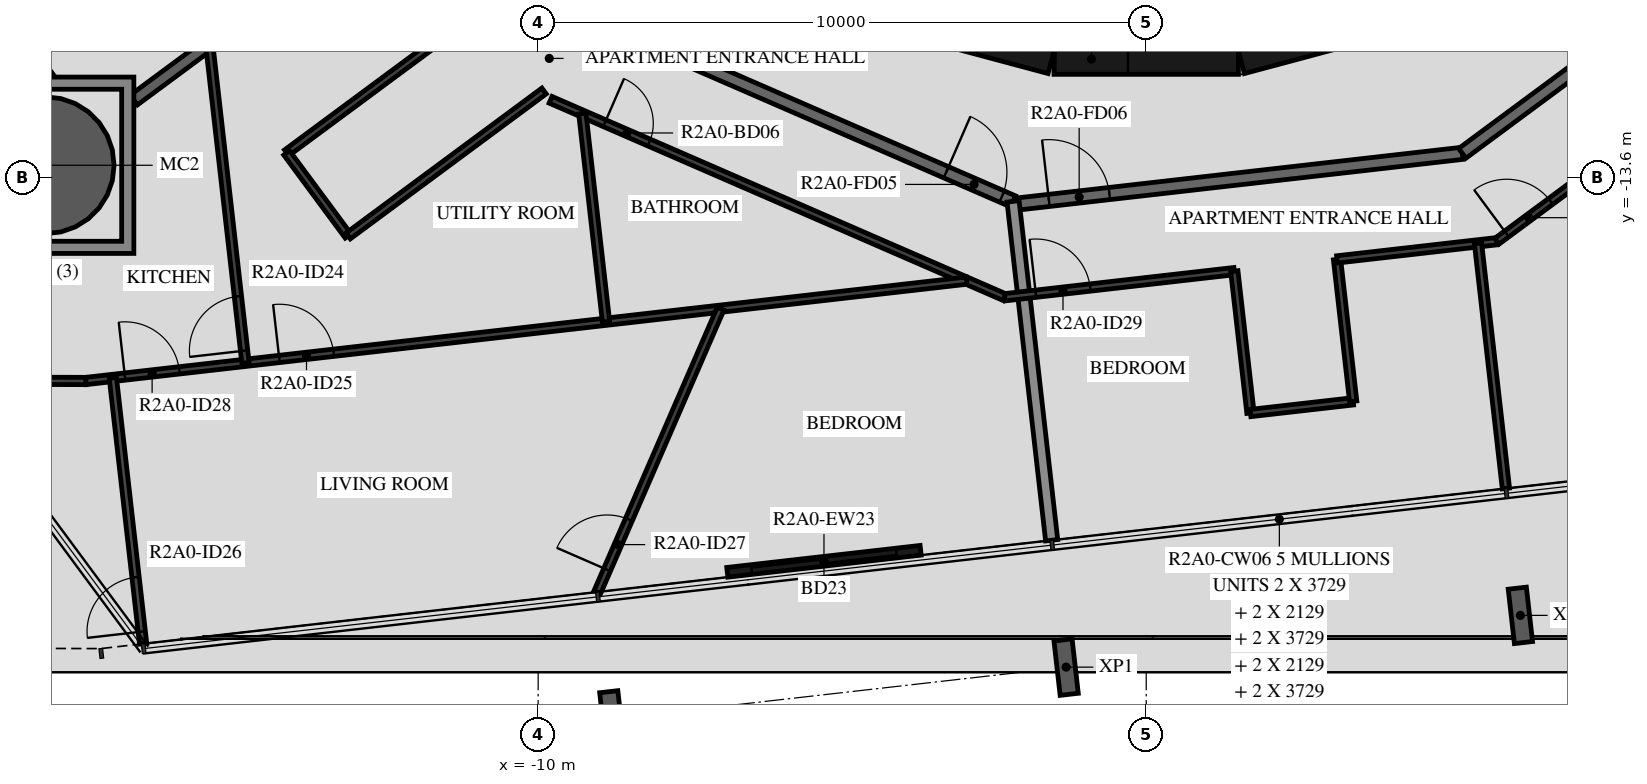
"""IFC4 building model, lengths in metres.
Left out: names, types, materials, properties, quantities, classifications, styles, units other than length and angle.
Written with IfcOpenShell. Run it as: python <this file> out.ifc"""

import sys

from ifc_helpers import new_model, si_unit, direction, frame, frame_2d, origin, origin_2d, place, context, subcontext, project, spatial, polyline, rectangle, hollow_circle, i_section, outline, extrude, element, fill, save


model = new_model("IFC4")
c1 = context("Model", 3, precision=1e-05, world=origin(), true_north=direction((0.0, 1.0)))
c2 = subcontext(c1, "Body", "Model", "MODEL_VIEW")
j1 = project(units=[si_unit("LENGTHUNIT", "METRE"), si_unit("PLANEANGLEUNIT", "RADIAN")], contexts=[c1])
p1 = place(None, origin())
s1 = spatial("IfcSite", under=j1, at=p1, CompositionType="ELEMENT")
p2 = place(p1, origin())
s2 = spatial("IfcBuilding", under=s1, at=p2, CompositionType="ELEMENT")
p3 = place(p2, frame((0.0, 0.0, 76.7)))
s3 = spatial("IfcBuildingStorey", under=s2, at=p3, CompositionType="ELEMENT", Elevation=76.7)
p4 = place(p3, frame((-18.099, -13.393, -0.45), z_axis=(0.0, 0.0, 1.0), x_axis=(1.0, 0.0, 0.0)))
e1 = element("IfcColumn", 1, at=p4, inside=s3, PredefinedType="COLUMN", context=c2, shape_type="SweptSolid", body=[
    extrude(hollow_circle(Radius=1.125, WallThickness=0.055, at=origin_2d()), origin(), (0.0, 0.0, 1.0), 3.57),
])
for number, where, z_axis, x_axis in (
    (2, (6.153, -20.795, -0.45), (0.0, 0.0, 1.0), (-0.994, -0.113, 0.0)),
    (3, (-8.788, -22.497, -0.45), (0.0, 0.0, 1.0), (-0.994, -0.113, 0.0)),
    (4, (-1.317, -21.646, -0.45), (0.0, 0.0, 1.0), (-0.994, -0.113, 0.0)),
):
    element("IfcColumn", number, at=place(p3, frame(where, z_axis=z_axis, x_axis=x_axis)), inside=s3, PredefinedType="COLUMN", context=c2, shape_type="SweptSolid", body=[
        extrude(i_section(OverallWidth=0.3, OverallDepth=0.9, WebThickness=0.019, FlangeThickness=0.035, FilletRadius=0.03, at=origin_2d()), origin(), (0.0, 0.0, 1.0), 3.57),
    ])
p5 = place(p3, frame((-6.889, -20.086, 0.0), z_axis=(0.0, 0.0, 1.0), x_axis=(0.993578576686, 0.113144208648, 0.0)))
e5 = element("IfcWall", 5, at=p5, inside=s3, PredefinedType="STANDARD", context=c2, shape_type="SweptSolid", body=[
    extrude(rectangle(XDim=3.2, YDim=0.16, at=frame_2d((1.6, 0.0))), origin(), (0.0, 0.0, 1.0), 3.12),
])
p6 = place(p5, frame((0.4, 0.0, 0.0)))
e6 = element("IfcOpeningElement", 6, at=p6, cuts=e5, PredefinedType="OPENING", context=c2, shape_type="SweptSolid", body=[
    extrude(rectangle(XDim=2.4, YDim=2.4, at=frame_2d((1.2, 1.2))), frame((0.0, 0.09, 0.0), z_axis=(0.0, -1.0, 0.0), x_axis=(1.0, 0.0, 0.0)), (0.0, 0.0, 1.0), 0.18),
])
for number, where, z_axis, x_axis in (
    (7, (1.55, -11.643, 0.0), (0.0, 0.0, 1.0), (0.966, 0.259, 0.0)),
    (8, (-4.479, -10.858, 0.0), (0.0, 0.0, 1.0), (0.966, -0.259, 0.0)),
):
    element("IfcWall", number, at=place(p3, frame(where, z_axis=z_axis, x_axis=x_axis)), inside=s3, PredefinedType="SHEAR", context=c2, shape_type="SweptSolid", body=[
        extrude(rectangle(XDim=3.033, YDim=0.5, at=frame_2d((1.516, 0.0))), origin(), (0.0, 0.0, 1.0), 3.12),
    ])
p7 = place(p3, frame((-1.516, -11.647, 0.0), z_axis=(0.0, 0.0, 1.0), x_axis=(1.0, 0.0, 0.0)))
e9 = element("IfcWall", 9, at=p7, inside=s3, PredefinedType="SHEAR", context=c2, shape_type="SweptSolid", body=[
    extrude(rectangle(XDim=3.033, YDim=0.5, at=frame_2d((1.516, 0.0))), origin(), (0.0, 0.0, 1.0), 3.12),
])
p8 = place(p7, frame((0.016, 0.0, 0.0)))
e10 = element("IfcOpeningElement", 10, at=p8, cuts=e9, PredefinedType="OPENING", context=c2, shape_type="SweptSolid", body=[
    extrude(rectangle(XDim=1.2, YDim=2.1, at=frame_2d((0.6, 1.05))), frame((0.0, 0.26, 0.0), z_axis=(0.0, -1.0, 0.0), x_axis=(1.0, 0.0, 0.0)), (0.0, 0.0, 1.0), 0.52),
])
p9 = place(p3, frame((-8.829, -11.1, 0.0), z_axis=(0.0, 0.0, 1.0), x_axis=(0.917063622491, -0.398740908742, 0.0)))
e11 = element("IfcWall", 11, at=p9, inside=s3, PredefinedType="STANDARD", context=c2, shape_type="SweptSolid", body=[
    extrude(rectangle(XDim=7.24, YDim=0.2, at=frame_2d((3.62, 0.0))), origin(), (0.0, 0.0, 1.0), 3.12),
])
p10 = place(p9, frame((6.04, 0.0, 0.0)))
e12 = element("IfcOpeningElement", 12, at=p10, cuts=e11, PredefinedType="OPENING", context=c2, shape_type="SweptSolid", body=[
    extrude(rectangle(XDim=1.0, YDim=2.1, at=frame_2d((0.5, 1.05))), frame((0.0, 0.11, 0.0), z_axis=(0.0, -1.0, 0.0), x_axis=(1.0, 0.0, 0.0)), (0.0, 0.0, 1.0), 0.22),
])
p11 = place(p3, frame((-2.096, -14.028, 0.0), z_axis=(0.0, 0.0, 1.0), x_axis=(0.993569170114, 0.113226782163, 0.0)))
e13 = element("IfcWall", 13, at=p11, inside=s3, PredefinedType="STANDARD", context=c2, shape_type="SweptSolid", body=[
    extrude(rectangle(XDim=7.342, YDim=0.2, at=frame_2d((3.671, 0.0))), origin(), (0.0, 0.0, 1.0), 3.12),
])
p12 = place(p11, frame((0.5, 0.0, 0.0)))
e14 = element("IfcOpeningElement", 14, at=p12, cuts=e13, PredefinedType="OPENING", context=c2, shape_type="SweptSolid", body=[
    extrude(rectangle(XDim=1.0, YDim=2.1, at=frame_2d((0.5, 1.05))), frame((0.0, 0.11, 0.0), z_axis=(0.0, -1.0, 0.0), x_axis=(1.0, 0.0, 0.0)), (0.0, 0.0, 1.0), 0.22),
])
p13 = place(p3, frame((5.198, -13.196, 0.0), z_axis=(0.0, 0.0, 1.0), x_axis=(0.803869883159, 0.594805187394, 0.0)))
e15 = element("IfcWall", 15, at=p13, inside=s3, PredefinedType="STANDARD", context=c2, shape_type="SweptSolid", body=[
    extrude(rectangle(XDim=7.342, YDim=0.2, at=frame_2d((3.671, 0.0))), origin(), (0.0, 0.0, 1.0), 3.12),
])
p14 = place(p3, frame((-16.649, -12.32, 0.0), z_axis=(0.0, 0.0, 1.0), x_axis=(0.803804030903, 0.594894175383, 0.0)))
e16 = element("IfcWall", 16, at=p14, inside=s3, PredefinedType="STANDARD", context=c2, shape_type="SweptSolid", body=[
    extrude(rectangle(XDim=1.542, YDim=0.2, at=frame_2d((0.771, 0.0))), origin(), (0.0, 0.0, 1.0), 3.12),
])
p15 = place(p3, frame((-1.555, -19.559, 0.0), z_axis=(0.0, 0.0, 1.0), x_axis=(-0.113221250863, 0.993569800443, 0.0)))
e17 = element("IfcWall", 17, at=p15, inside=s3, PredefinedType="STANDARD", context=c2, shape_type="SweptSolid", body=[
    extrude(rectangle(XDim=5.609, YDim=0.2, at=frame_2d((2.804, 0.0))), origin(), (0.0, 0.0, 1.0), 2.73),
])
p16 = place(p3, frame((-21.298, -11.722, 0.0), z_axis=(0.0, 0.0, 1.0), x_axis=(0.398737387658, 0.917065153456, 0.0)))
e18 = element("IfcWall", 18, at=p16, inside=s3, PredefinedType="PARTITIONING", context=c2, shape_type="SweptSolid", body=[
    extrude(rectangle(XDim=11.875, YDim=0.12, at=frame_2d((5.938, 0.0))), origin(), (0.0, 0.0, 1.0), 3.12),
])
p17 = place(p16, frame((8.26, 0.0, 0.0)))
e19 = element("IfcOpeningElement", 19, at=p17, cuts=e18, PredefinedType="OPENING", context=c2, shape_type="SweptSolid", body=[
    extrude(rectangle(XDim=0.9, YDim=2.1, at=frame_2d((0.45, 1.05))), frame((0.0, 0.07, 0.0), z_axis=(0.0, -1.0, 0.0), x_axis=(1.0, 0.0, 0.0)), (0.0, 0.0, 1.0), 0.14),
])
p18 = place(p16, frame((3.094, 0.0, 0.0)))
e20 = element("IfcOpeningElement", 20, at=p18, cuts=e18, PredefinedType="OPENING", context=c2, shape_type="SweptSolid", body=[
    extrude(rectangle(XDim=0.9, YDim=2.1, at=frame_2d((0.45, 1.05))), frame((0.0, 0.07, 0.0), z_axis=(0.0, -1.0, 0.0), x_axis=(1.0, 0.0, 0.0)), (0.0, 0.0, 1.0), 0.14),
])
p19 = place(p3, frame((-20.144, -9.068, 0.0), z_axis=(0.0, 0.0, 1.0), x_axis=(0.59487477233, -0.803818390711, 0.0)))
e21 = element("IfcWall", 21, at=p19, inside=s3, PredefinedType="PARTITIONING", context=c2, shape_type="SweptSolid", body=[
    extrude(rectangle(XDim=3.575, YDim=0.12, at=frame_2d((1.788, 0.0))), origin(), (0.0, 0.0, 1.0), 3.12),
])
p20 = place(p19, frame((0.4, 0.0, 0.0)))
e22 = element("IfcOpeningElement", 22, at=p20, cuts=e21, PredefinedType="OPENING", context=c2, shape_type="SweptSolid", body=[
    extrude(rectangle(XDim=0.8, YDim=2.1, at=frame_2d((0.4, 1.05))), frame((0.0, 0.07, 0.0), z_axis=(0.0, -1.0, 0.0), x_axis=(1.0, 0.0, 0.0)), (0.0, 0.0, 1.0), 0.14),
])
p21 = place(p3, frame((-10.914, -10.804, 0.0), z_axis=(0.0, 0.0, 1.0), x_axis=(-0.803864616889, -0.594812304609, 0.0)))
e23 = element("IfcWall", 23, at=p21, inside=s3, PredefinedType="PARTITIONING", context=c2, shape_type="SweptSolid", body=[
    extrude(rectangle(XDim=4.008, YDim=0.12, at=frame_2d((2.004, 0.0))), origin(), (0.0, 0.0, 1.0), 3.12),
])
p22 = place(p3, frame((-14.136, -13.188, 0.0), z_axis=(0.0, 0.0, 1.0), x_axis=(0.594863421241, -0.803826791087, 0.0)))
e24 = element("IfcWall", 24, at=p22, inside=s3, PredefinedType="PARTITIONING", context=c2, shape_type="SweptSolid", body=[
    extrude(rectangle(XDim=1.7, YDim=0.12, at=frame_2d((0.85, 0.0))), origin(), (0.0, 0.0, 1.0), 3.12),
])
p23 = place(p3, frame((-13.125, -14.555, 0.0), z_axis=(0.0, 0.0, 1.0), x_axis=(0.80389374229, 0.594772940799, 0.0)))
e25 = element("IfcWall", 25, at=p23, inside=s3, PredefinedType="PARTITIONING", context=c2, shape_type="SweptSolid", body=[
    extrude(rectangle(XDim=4.008, YDim=0.12, at=frame_2d((2.004, 0.0))), origin(), (0.0, 0.0, 1.0), 3.12),
])
p24 = place(p3, frame((-9.796, -12.315, 0.0), z_axis=(0.0, 0.0, 1.0), x_axis=(0.917059572812, -0.398750222463, 0.0)))
e26 = element("IfcWall", 26, at=p24, inside=s3, PredefinedType="PARTITIONING", context=c2, shape_type="SweptSolid", body=[
    extrude(rectangle(XDim=8.146, YDim=0.12, at=frame_2d((4.073, 0.0))), origin(), (0.0, 0.0, 1.0), 3.12),
])
p25 = place(p24, frame((0.969, 0.0, 0.0)))
e27 = element("IfcOpeningElement", 27, at=p25, cuts=e26, PredefinedType="OPENING", context=c2, shape_type="SweptSolid", body=[
    extrude(rectangle(XDim=0.8, YDim=2.1, at=frame_2d((0.4, 1.05))), frame((0.0, 0.07, 0.0), z_axis=(0.0, -1.0, 0.0), x_axis=(1.0, 0.0, 0.0)), (0.0, 0.0, 1.0), 0.14),
])
p26 = place(p3, frame((-2.326, -15.563, 0.0), z_axis=(0.0, 0.0, 1.0), x_axis=(0.993575068384, 0.113175012641, 0.0)))
e28 = element("IfcWall", 28, at=p26, inside=s3, PredefinedType="PARTITIONING", context=c2, shape_type="SweptSolid", body=[
    extrude(rectangle(XDim=3.799, YDim=0.12, at=frame_2d((1.899, 0.0))), origin(), (0.0, 0.0, 1.0), 3.12),
])
p27 = place(p26, frame((0.513, 0.0, 0.0)))
e29 = element("IfcOpeningElement", 29, at=p27, cuts=e28, PredefinedType="OPENING", context=c2, shape_type="SweptSolid", body=[
    extrude(rectangle(XDim=0.9, YDim=2.1, at=frame_2d((0.45, 1.05))), frame((0.0, 0.07, 0.0), z_axis=(0.0, -1.0, 0.0), x_axis=(1.0, 0.0, 0.0)), (0.0, 0.0, 1.0), 0.14),
])
p28 = place(p3, frame((-18.524, -16.937, 0.0), z_axis=(0.0, 0.0, 1.0), x_axis=(0.999995736722, -0.00292002349, 0.0)))
e30 = element("IfcWall", 30, at=p28, inside=s3, PredefinedType="PARTITIONING", context=c2, shape_type="SweptSolid", body=[
    extrude(rectangle(XDim=1.087, YDim=0.12, at=frame_2d((0.543, 0.0))), origin(), (0.0, 0.0, 1.0), 3.12),
])
p29 = place(p3, frame((-17.437, -16.94, 0.0), z_axis=(0.0, 0.0, 1.0), x_axis=(0.993573314119, 0.113190412448, 0.0)))
e31 = element("IfcWall", 31, at=p29, inside=s3, PredefinedType="PARTITIONING", context=c2, shape_type="SweptSolid", body=[
    extrude(rectangle(XDim=14.576, YDim=0.12, at=frame_2d((7.288, 0.0))), origin(), (0.0, 0.0, 1.0), 3.12),
])
p30 = place(p29, frame((3.201, 0.0, 0.0)))
e32 = element("IfcOpeningElement", 32, at=p30, cuts=e31, PredefinedType="OPENING", context=c2, shape_type="SweptSolid", body=[
    extrude(rectangle(XDim=0.9, YDim=2.1, at=frame_2d((0.45, 1.05))), frame((0.0, 0.07, 0.0), z_axis=(0.0, -1.0, 0.0), x_axis=(1.0, 0.0, 0.0)), (0.0, 0.0, 1.0), 0.14),
])
p31 = place(p29, frame((0.645, 0.0, 0.0)))
e33 = element("IfcOpeningElement", 33, at=p31, cuts=e31, PredefinedType="OPENING", context=c2, shape_type="SweptSolid", body=[
    extrude(rectangle(XDim=0.9, YDim=2.1, at=frame_2d((0.45, 1.05))), frame((0.0, 0.07, 0.0), z_axis=(0.0, -1.0, 0.0), x_axis=(1.0, 0.0, 0.0)), (0.0, 0.0, 1.0), 0.14),
])
p32 = place(p3, frame((-14.813, -16.641, 0.0), z_axis=(0.0, 0.0, 1.0), x_axis=(-0.113210971478, 0.993570971767, 0.0)))
e34 = element("IfcWall", 34, at=p32, inside=s3, PredefinedType="PARTITIONING", context=c2, shape_type="SweptSolid", body=[
    extrude(rectangle(XDim=5.273, YDim=0.12, at=frame_2d((2.636, 0.0))), origin(), (0.0, 0.0, 1.0), 3.12),
])
p33 = place(p32, frame((0.2, 0.0, 0.0)))
e35 = element("IfcOpeningElement", 35, at=p33, cuts=e34, PredefinedType="OPENING", context=c2, shape_type="SweptSolid", body=[
    extrude(rectangle(XDim=0.9, YDim=2.1, at=frame_2d((0.45, 1.05))), frame((0.0, 0.07, 0.0), z_axis=(0.0, -1.0, 0.0), x_axis=(1.0, 0.0, 0.0)), (0.0, 0.0, 1.0), 0.14),
])
p34 = place(p3, frame((-16.496, -21.262, 0.0), z_axis=(0.0, 0.0, 1.0), x_axis=(-0.1132445713, 0.993567142709, 0.0)))
e36 = element("IfcWall", 36, at=p34, inside=s3, PredefinedType="PARTITIONING", context=c2, shape_type="SweptSolid", body=[
    extrude(rectangle(XDim=4.4, YDim=0.12, at=frame_2d((2.2, 0.0))), origin(), (0.0, 0.0, 1.0), 2.73),
])
p35 = place(p34, frame((0.2, 0.0, 0.0)))
e37 = element("IfcOpeningElement", 37, at=p35, cuts=e36, PredefinedType="OPENING", context=c2, shape_type="SweptSolid", body=[
    extrude(rectangle(XDim=0.9, YDim=2.1, at=frame_2d((0.45, 1.05))), frame((0.0, 0.07, 0.0), z_axis=(0.0, -1.0, 0.0), x_axis=(1.0, 0.0, 0.0)), (0.0, 0.0, 1.0), 0.14),
])
p36 = place(p3, frame((-8.884, -15.966, 0.0), z_axis=(0.0, 0.0, 1.0), x_axis=(-0.113230836929, 0.993568708026, 0.0)))
e38 = element("IfcWall", 38, at=p36, inside=s3, PredefinedType="PARTITIONING", context=c2, shape_type="SweptSolid", body=[
    extrude(rectangle(XDim=3.446, YDim=0.12, at=frame_2d((1.723, 0.0))), origin(), (0.0, 0.0, 1.0), 3.12),
])
p37 = place(p3, frame((-9.026, -20.41, 0.0), z_axis=(0.0, 0.0, 1.0), x_axis=(0.398750711167, 0.917059360316, 0.0)))
e39 = element("IfcWall", 39, at=p37, inside=s3, PredefinedType="PARTITIONING", context=c2, shape_type="SweptSolid", body=[
    extrude(rectangle(XDim=5.081, YDim=0.12, at=frame_2d((2.54, 0.0))), origin(), (0.0, 0.0, 1.0), 3.12),
])
p38 = place(p37, frame((0.4, 0.0, 0.0)))
e40 = element("IfcOpeningElement", 40, at=p38, cuts=e39, PredefinedType="OPENING", context=c2, shape_type="SweptSolid", body=[
    extrude(rectangle(XDim=0.9, YDim=2.1, at=frame_2d((0.45, 1.05))), frame((0.0, 0.07, 0.0), z_axis=(0.0, -1.0, 0.0), x_axis=(1.0, 0.0, 0.0)), (0.0, 0.0, 1.0), 0.14),
])
p39 = place(p3, frame((1.448, -15.133, 0.0), z_axis=(0.0, 0.0, 1.0), x_axis=(0.113180189053, -0.993574478741, 0.0)))
e41 = element("IfcWall", 41, at=p39, inside=s3, PredefinedType="PARTITIONING", context=c2, shape_type="SweptSolid", body=[
    extrude(rectangle(XDim=2.349, YDim=0.12, at=frame_2d((1.175, 0.0))), origin(), (0.0, 0.0, 1.0), 3.12),
])
p40 = place(p3, frame((1.714, -17.467, 0.0), z_axis=(0.0, 0.0, 1.0), x_axis=(0.993577030812, 0.113157782957, 0.0)))
e42 = element("IfcWall", 42, at=p40, inside=s3, PredefinedType="PARTITIONING", context=c2, shape_type="SweptSolid", body=[
    extrude(rectangle(XDim=1.7, YDim=0.12, at=frame_2d((0.85, 0.0))), origin(), (0.0, 0.0, 1.0), 3.12),
])
p41 = place(p3, frame((3.404, -17.275, 0.0), z_axis=(0.0, 0.0, 1.0), x_axis=(-0.113180189053, 0.993574478741, 0.0)))
e43 = element("IfcWall", 43, at=p41, inside=s3, PredefinedType="PARTITIONING", context=c2, shape_type="SweptSolid", body=[
    extrude(rectangle(XDim=2.349, YDim=0.12, at=frame_2d((1.175, 0.0))), origin(), (0.0, 0.0, 1.0), 3.12),
])
p42 = place(p3, frame((3.138, -14.941, 0.0), z_axis=(0.0, 0.0, 1.0), x_axis=(0.99356355736, 0.113276023437, 0.0)))
e44 = element("IfcWall", 44, at=p42, inside=s3, PredefinedType="PARTITIONING", context=c2, shape_type="SweptSolid", body=[
    extrude(rectangle(XDim=2.647, YDim=0.12, at=frame_2d((1.323, 0.0))), origin(), (0.0, 0.0, 1.0), 3.12),
])
p43 = place(p3, frame((5.767, -14.641, 0.0), z_axis=(0.0, 0.0, 1.0), x_axis=(0.803867427863, 0.594808505673, 0.0)))
e45 = element("IfcWall", 45, at=p43, inside=s3, PredefinedType="PARTITIONING", context=c2, shape_type="SweptSolid", body=[
    extrude(rectangle(XDim=7.316, YDim=0.12, at=frame_2d((3.658, 0.0))), origin(), (0.0, 0.0, 1.0), 3.12),
])
p44 = place(p43, frame((0.2, 0.0, 0.0)))
e46 = element("IfcOpeningElement", 46, at=p44, cuts=e45, PredefinedType="OPENING", context=c2, shape_type="SweptSolid", body=[
    extrude(rectangle(XDim=0.9, YDim=2.1, at=frame_2d((0.45, 1.05))), frame((0.0, 0.07, 0.0), z_axis=(0.0, -1.0, 0.0), x_axis=(1.0, 0.0, 0.0)), (0.0, 0.0, 1.0), 0.14),
])
p45 = place(p43, frame((5.385, 0.0, 0.0)))
e47 = element("IfcOpeningElement", 47, at=p45, cuts=e45, PredefinedType="OPENING", context=c2, shape_type="SweptSolid", body=[
    extrude(rectangle(XDim=0.8, YDim=2.1, at=frame_2d((0.4, 1.05))), frame((0.0, 0.07, 0.0), z_axis=(0.0, -1.0, 0.0), x_axis=(1.0, 0.0, 0.0)), (0.0, 0.0, 1.0), 0.14),
])
p46 = place(p3, frame((5.915, -18.708, 0.0), z_axis=(0.0, 0.0, 1.0), x_axis=(-0.113244511591, 0.993567149515, 0.0)))
e48 = element("IfcWall", 48, at=p46, inside=s3, PredefinedType="PARTITIONING", context=c2, shape_type="SweptSolid", body=[
    extrude(rectangle(XDim=4.057, YDim=0.12, at=frame_2d((2.029, 0.0))), origin(), (0.0, 0.0, 1.0), 2.73),
])
p47 = place(p3, origin())
e49 = element("IfcWall", 49, at=p47, inside=s3, PredefinedType="STANDARD", context=c2, shape_type="SweptSolid", body=[
    extrude(outline(polyline([(-16.649, -11.942), (-16.649, -14.843), (-19.549, -14.843), (-19.549, -11.942), (-16.649, -11.942)]), holes=[polyline([(-19.349, -14.643), (-16.849, -14.643), (-16.849, -12.143), (-19.349, -12.143), (-19.349, -14.643)])]), origin(), (0.0, 0.0, 1.0), 3.12),
])
p48 = place(p6, origin())
e50 = element("IfcDoor", 50, at=p48, inside=s3, OperationType="DOUBLE_DOOR_SLIDING", PredefinedType="DOOR", context=c2, shape_type="SweptSolid", body=[
    extrude(rectangle(XDim=2.4, YDim=2.4, at=frame_2d((1.2, 1.2))), frame((0.0, 0.025, 0.0), z_axis=(0.0, -1.0, 0.0), x_axis=(1.0, 0.0, 0.0)), (0.0, 0.0, 1.0), 0.05),
])
fill(e6, e50)
p49 = place(p8, origin())
e51 = element("IfcDoor", 51, at=p49, inside=s3, OperationType="SINGLE_SWING_RIGHT", PredefinedType="DOOR", context=c2, shape_type="SweptSolid", body=[
    extrude(rectangle(XDim=1.2, YDim=2.1, at=frame_2d((0.6, 1.05))), frame((0.0, 0.025, 0.0), z_axis=(0.0, -1.0, 0.0), x_axis=(1.0, 0.0, 0.0)), (0.0, 0.0, 1.0), 0.05),
])
fill(e10, e51)
p50 = place(p10, origin())
e52 = element("IfcDoor", 52, at=p50, inside=s3, OperationType="SINGLE_SWING_LEFT", PredefinedType="DOOR", context=c2, shape_type="SweptSolid", body=[
    extrude(rectangle(XDim=1.0, YDim=2.1, at=frame_2d((0.5, 1.05))), frame((0.0, 0.025, 0.0), z_axis=(0.0, -1.0, 0.0), x_axis=(1.0, 0.0, 0.0)), (0.0, 0.0, 1.0), 0.05),
])
fill(e12, e52)
p51 = place(p25, origin())
e53 = element("IfcDoor", 53, at=p51, inside=s3, OperationType="SINGLE_SWING_LEFT", PredefinedType="DOOR", context=c2, shape_type="SweptSolid", body=[
    extrude(rectangle(XDim=0.8, YDim=2.1, at=frame_2d((0.4, 1.05))), frame((0.0, 0.025, 0.0), z_axis=(0.0, -1.0, 0.0), x_axis=(1.0, 0.0, 0.0)), (0.0, 0.0, 1.0), 0.05),
])
fill(e27, e53)
p52 = place(p33, origin())
e54 = element("IfcDoor", 54, at=p52, inside=s3, OperationType="SINGLE_SWING_LEFT", PredefinedType="DOOR", context=c2, shape_type="SweptSolid", body=[
    extrude(rectangle(XDim=0.9, YDim=2.1, at=frame_2d((0.45, 1.05))), frame((0.0, 0.025, 0.0), z_axis=(0.0, -1.0, 0.0), x_axis=(1.0, 0.0, 0.0)), (0.0, 0.0, 1.0), 0.05),
])
fill(e35, e54)
p53 = place(p30, origin())
e55 = element("IfcDoor", 55, at=p53, inside=s3, OperationType="SINGLE_SWING_LEFT", PredefinedType="DOOR", context=c2, shape_type="SweptSolid", body=[
    extrude(rectangle(XDim=0.9, YDim=2.1, at=frame_2d((0.45, 1.05))), frame((0.0, 0.025, 0.0), z_axis=(0.0, -1.0, 0.0), x_axis=(1.0, 0.0, 0.0)), (0.0, 0.0, 1.0), 0.05),
])
fill(e32, e55)
p54 = place(p35, origin())
e56 = element("IfcDoor", 56, at=p54, inside=s3, OperationType="SINGLE_SWING_LEFT", PredefinedType="DOOR", context=c2, shape_type="SweptSolid", body=[
    extrude(rectangle(XDim=0.9, YDim=2.1, at=frame_2d((0.45, 1.05))), frame((0.0, 0.025, 0.0), z_axis=(0.0, -1.0, 0.0), x_axis=(1.0, 0.0, 0.0)), (0.0, 0.0, 1.0), 0.05),
])
fill(e37, e56)
p55 = place(p38, origin())
e57 = element("IfcDoor", 57, at=p55, inside=s3, OperationType="SINGLE_SWING_RIGHT", PredefinedType="DOOR", context=c2, shape_type="SweptSolid", body=[
    extrude(rectangle(XDim=0.9, YDim=2.1, at=frame_2d((0.45, 1.05))), frame((0.0, 0.025, 0.0), z_axis=(0.0, -1.0, 0.0), x_axis=(1.0, 0.0, 0.0)), (0.0, 0.0, 1.0), 0.05),
])
fill(e40, e57)
p56 = place(p31, origin())
e58 = element("IfcDoor", 58, at=p56, inside=s3, OperationType="SINGLE_SWING_RIGHT", PredefinedType="DOOR", context=c2, shape_type="SweptSolid", body=[
    extrude(rectangle(XDim=0.9, YDim=2.1, at=frame_2d((0.45, 1.05))), frame((0.0, 0.025, 0.0), z_axis=(0.0, -1.0, 0.0), x_axis=(1.0, 0.0, 0.0)), (0.0, 0.0, 1.0), 0.05),
])
fill(e33, e58)
p57 = place(p12, origin())
e59 = element("IfcDoor", 59, at=p57, inside=s3, OperationType="SINGLE_SWING_LEFT", PredefinedType="DOOR", context=c2, shape_type="SweptSolid", body=[
    extrude(rectangle(XDim=1.0, YDim=2.1, at=frame_2d((0.5, 1.05))), frame((0.0, 0.025, 0.0), z_axis=(0.0, -1.0, 0.0), x_axis=(1.0, 0.0, 0.0)), (0.0, 0.0, 1.0), 0.05),
])
fill(e14, e59)
p58 = place(p27, origin())
e60 = element("IfcDoor", 60, at=p58, inside=s3, OperationType="SINGLE_SWING_LEFT", PredefinedType="DOOR", context=c2, shape_type="SweptSolid", body=[
    extrude(rectangle(XDim=0.9, YDim=2.1, at=frame_2d((0.45, 1.05))), frame((0.0, 0.025, 0.0), z_axis=(0.0, -1.0, 0.0), x_axis=(1.0, 0.0, 0.0)), (0.0, 0.0, 1.0), 0.05),
])
fill(e29, e60)
p59 = place(p44, origin())
e61 = element("IfcDoor", 61, at=p59, inside=s3, OperationType="SINGLE_SWING_RIGHT", PredefinedType="DOOR", context=c2, shape_type="SweptSolid", body=[
    extrude(rectangle(XDim=0.9, YDim=2.1, at=frame_2d((0.45, 1.05))), frame((0.0, 0.025, 0.0), z_axis=(0.0, -1.0, 0.0), x_axis=(1.0, 0.0, 0.0)), (0.0, 0.0, 1.0), 0.05),
])
fill(e46, e61)
save(model, sys.argv[1])
